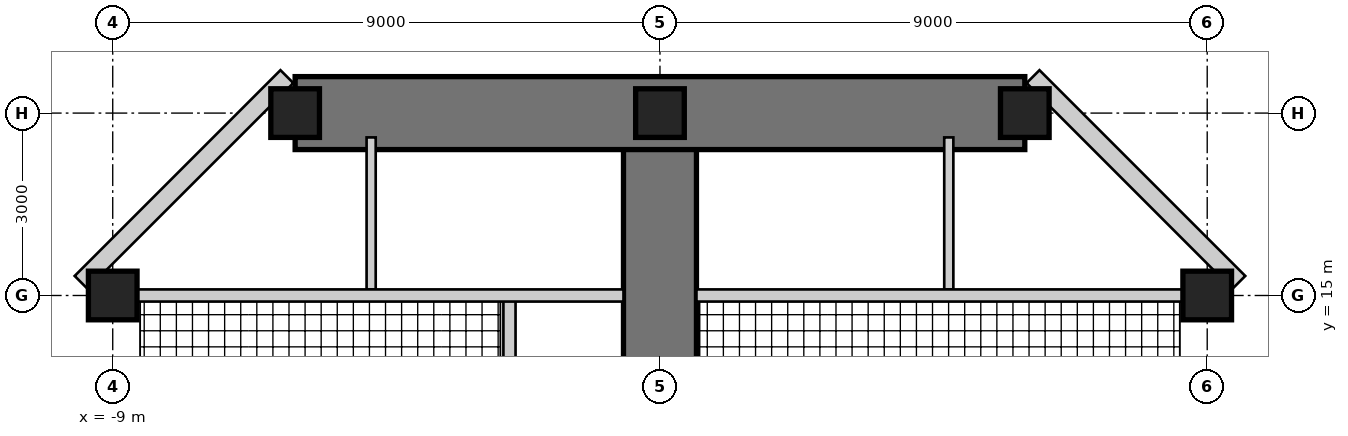
"""IFC4 building model, lengths in metres.
Left out: names, types, materials, properties, quantities, classifications, styles, units other than length and angle.
Written with IfcOpenShell. Run it as: python <this file> out.ifc"""

import sys

from ifc_helpers import new_model, si_unit, direction, frame, frame_2d, origin, origin_2d, place, context, subcontext, project, spatial, rectangle, hollow_rectangle, extrude, element, fill, save


model = new_model("IFC4")
c1 = context("Model", 3, precision=1e-05, world=origin(), true_north=direction((0.0, 1.0)))
c2 = subcontext(c1, "Body", "Model", "MODEL_VIEW")
j1 = project(units=[si_unit("LENGTHUNIT", "METRE"), si_unit("PLANEANGLEUNIT", "RADIAN")], contexts=[c1])
p1 = place(None, origin())
s1 = spatial("IfcSite", under=j1, at=p1, CompositionType="ELEMENT")
p2 = place(p1, origin())
s2 = spatial("IfcBuilding", under=s1, at=p2, CompositionType="ELEMENT")
p3 = place(p2, frame((0.0, 0.0, 225.5)))
s3 = spatial("IfcBuildingStorey", under=s2, at=p3, CompositionType="ELEMENT", Elevation=225.5)
p4 = place(p3, frame((0.0, 9.0, 0.0), z_axis=(0.0, 0.0, 1.0), x_axis=(0.0, 1.0, 0.0)))
e1 = element("IfcWall", 1, at=p4, inside=s3, PredefinedType="SHEAR", context=c2, shape_type="SweptSolid", body=[
    extrude(rectangle(XDim=9.0, YDim=1.2, at=frame_2d((4.5, 0.0))), origin(), (0.0, 0.0, 1.0), 3.4),
])
p5 = place(p4, frame((3.8, 0.0, 0.0)))
e2 = element("IfcOpeningElement", 2, at=p5, cuts=e1, PredefinedType="OPENING", context=c2, shape_type="SweptSolid", body=[
    extrude(rectangle(XDim=1.0, YDim=2.15, at=frame_2d((0.5, 1.075))), frame((0.0, 0.61, 0.0), z_axis=(0.0, -1.0, 0.0), x_axis=(1.0, 0.0, 0.0)), (0.0, 0.0, 1.0), 1.22),
])
p6 = place(p4, frame((7.0, 0.0, 0.0)))
e3 = element("IfcOpeningElement", 3, at=p6, cuts=e1, PredefinedType="OPENING", context=c2, shape_type="SweptSolid", body=[
    extrude(rectangle(XDim=1.0, YDim=2.2, at=frame_2d((0.5, 1.1))), frame((0.0, 0.61, 0.0), z_axis=(0.0, -1.0, 0.0), x_axis=(1.0, 0.0, 0.0)), (0.0, 0.0, 1.0), 1.22),
])
p7 = place(p3, frame((6.0, 18.0, 0.0), z_axis=(0.0, 0.0, 1.0), x_axis=(-1.0, 0.0, 0.0)))
e4 = element("IfcWall", 4, at=p7, inside=s3, PredefinedType="SHEAR", context=c2, shape_type="SweptSolid", body=[
    extrude(rectangle(XDim=12.0, YDim=1.2, at=frame_2d((6.0, 0.0))), origin(), (0.0, 0.0, 1.0), 3.4),
])
p8 = place(p7, frame((1.5, 0.0, 0.6)))
e5 = element("IfcOpeningElement", 5, at=p8, cuts=e4, PredefinedType="OPENING", context=c2, shape_type="SweptSolid", body=[
    extrude(rectangle(XDim=3.0, YDim=2.4, at=frame_2d((1.5, 1.2))), frame((0.0, 0.61, 0.0), z_axis=(0.0, -1.0, 0.0), x_axis=(1.0, 0.0, 0.0)), (0.0, 0.0, 1.0), 1.22),
])
p9 = place(p7, frame((7.5, 0.0, 0.6)))
e6 = element("IfcOpeningElement", 6, at=p9, cuts=e4, PredefinedType="OPENING", context=c2, shape_type="SweptSolid", body=[
    extrude(rectangle(XDim=3.0, YDim=2.4, at=frame_2d((1.5, 1.2))), frame((0.0, 0.61, 0.0), z_axis=(0.0, -1.0, 0.0), x_axis=(1.0, 0.0, 0.0)), (0.0, 0.0, 1.0), 1.22),
])
for number, where, z_axis, x_axis in (
    (7, (9.0, 15.0, 0.0), (0.0, 0.0, 1.0), (1.0, 0.0, 0.0)),
    (8, (-9.0, 15.0, 0.0), (0.0, 0.0, 1.0), (1.0, 0.0, 0.0)),
    (9, (6.0, 18.0, 0.0), (0.0, 0.0, 1.0), (1.0, 0.0, 0.0)),
    (10, (0.0, 18.0, 0.0), (0.0, 0.0, 1.0), (1.0, 0.0, 0.0)),
    (11, (-6.0, 18.0, 0.0), (0.0, 0.0, 1.0), (1.0, 0.0, 0.0)),
):
    element("IfcColumn", number, at=place(p3, frame(where, z_axis=z_axis, x_axis=x_axis)), inside=s3, PredefinedType="COLUMN", context=c2, shape_type="SweptSolid", body=[
        extrude(rectangle(XDim=0.8, YDim=0.8, at=origin_2d()), origin(), (0.0, 0.0, 1.0), 3.4),
    ])
p10 = place(p3, frame((9.52, 15.215, 0.0), z_axis=(0.0, 0.0, 1.0), x_axis=(-0.707081278264, 0.707132283189, 0.0)))
e12 = element("IfcWall", 12, at=p10, inside=s3, PredefinedType="SOLIDWALL", context=c2, shape_type="SweptSolid", body=[
    extrude(rectangle(XDim=4.787, YDim=0.3, at=frame_2d((2.393, 0.0))), origin(), (0.0, 0.0, 1.0), 3.22),
])
p11 = place(p10, frame((1.943, 0.0, 0.3)))
e13 = element("IfcOpeningElement", 13, at=p11, cuts=e12, PredefinedType="OPENING", context=c2, shape_type="SweptSolid", body=[
    extrude(rectangle(XDim=0.9, YDim=2.4, at=frame_2d((0.45, 1.2))), frame((0.0, 0.16, 0.0), z_axis=(0.0, -1.0, 0.0), x_axis=(1.0, 0.0, 0.0)), (0.0, 0.0, 1.0), 0.32),
])
p12 = place(p3, frame((-6.135, 18.6, 0.0), z_axis=(0.0, 0.0, 1.0), x_axis=(-0.707081278264, -0.707132283189, 0.0)))
e14 = element("IfcWall", 14, at=p12, inside=s3, PredefinedType="SOLIDWALL", context=c2, shape_type="SweptSolid", body=[
    extrude(rectangle(XDim=4.787, YDim=0.3, at=frame_2d((2.393, 0.0))), origin(), (0.0, 0.0, 1.0), 3.22),
])
p13 = place(p12, frame((1.943, 0.0, 0.3)))
e15 = element("IfcOpeningElement", 15, at=p13, cuts=e14, PredefinedType="OPENING", context=c2, shape_type="SweptSolid", body=[
    extrude(rectangle(XDim=0.9, YDim=2.4, at=frame_2d((0.45, 1.2))), frame((0.0, 0.16, 0.0), z_axis=(0.0, -1.0, 0.0), x_axis=(1.0, 0.0, 0.0)), (0.0, 0.0, 1.0), 0.32),
])
p14 = place(p3, frame((-2.475, 9.4, 0.0), z_axis=(0.0, 0.0, 1.0), x_axis=(0.0, 1.0, 0.0)))
e16 = element("IfcWall", 16, at=p14, inside=s3, PredefinedType="SOLIDWALL", context=c2, shape_type="SweptSolid", body=[
    extrude(rectangle(XDim=5.6, YDim=0.2, at=frame_2d((2.8, 0.0))), origin(), (0.0, 0.0, 1.0), 3.22),
])
p15 = place(p14, frame((3.4, 0.0, 0.0)))
e17 = element("IfcOpeningElement", 17, at=p15, cuts=e16, PredefinedType="OPENING", context=c2, shape_type="SweptSolid", body=[
    extrude(rectangle(XDim=1.0, YDim=2.15, at=frame_2d((0.5, 1.075))), frame((0.0, 0.11, 0.0), z_axis=(0.0, -1.0, 0.0), x_axis=(1.0, 0.0, 0.0)), (0.0, 0.0, 1.0), 0.22),
])
p16 = place(p3, frame((-4.75, 15.1, 0.0), z_axis=(0.0, 0.0, 1.0), x_axis=(0.0, 1.0, 0.0)))
e18 = element("IfcWall", 18, at=p16, inside=s3, PredefinedType="PARTITIONING", context=c2, shape_type="SweptSolid", body=[
    extrude(rectangle(XDim=2.5, YDim=0.15, at=frame_2d((1.25, 0.0))), origin(), (0.0, 0.0, 1.0), 3.22),
])
p17 = place(p16, frame((0.6, 0.0, 0.0)))
e19 = element("IfcOpeningElement", 19, at=p17, cuts=e18, PredefinedType="OPENING", context=c2, shape_type="SweptSolid", body=[
    extrude(rectangle(XDim=1.0, YDim=2.1, at=frame_2d((0.5, 1.05))), frame((0.0, 0.085, 0.0), z_axis=(0.0, -1.0, 0.0), x_axis=(1.0, 0.0, 0.0)), (0.0, 0.0, 1.0), 0.17),
])
p18 = place(p3, frame((4.75, 15.1, 0.0), z_axis=(0.0, 0.0, 1.0), x_axis=(0.0, 1.0, 0.0)))
e20 = element("IfcWall", 20, at=p18, inside=s3, PredefinedType="PARTITIONING", context=c2, shape_type="SweptSolid", body=[
    extrude(rectangle(XDim=2.5, YDim=0.15, at=frame_2d((1.25, 0.0))), origin(), (0.0, 0.0, 1.0), 3.22),
])
p19 = place(p18, frame((0.6, 0.0, 0.0)))
e21 = element("IfcOpeningElement", 21, at=p19, cuts=e20, PredefinedType="OPENING", context=c2, shape_type="SweptSolid", body=[
    extrude(rectangle(XDim=1.0, YDim=2.1, at=frame_2d((0.5, 1.05))), frame((0.0, 0.085, 0.0), z_axis=(0.0, -1.0, 0.0), x_axis=(1.0, 0.0, 0.0)), (0.0, 0.0, 1.0), 0.17),
])
p20 = place(p3, frame((8.6, 15.0, 0.0), z_axis=(0.0, 0.0, 1.0), x_axis=(-1.0, 0.0, 0.0)))
e22 = element("IfcWall", 22, at=p20, inside=s3, PredefinedType="SOLIDWALL", context=c2, shape_type="SweptSolid", body=[
    extrude(rectangle(XDim=8.0, YDim=0.2, at=frame_2d((4.0, 0.0))), origin(), (0.0, 0.0, 1.0), 2.52),
])
p21 = place(p3, frame((-0.6, 15.0, 0.0), z_axis=(0.0, 0.0, 1.0), x_axis=(-1.0, 0.0, 0.0)))
e23 = element("IfcWall", 23, at=p21, inside=s3, PredefinedType="SOLIDWALL", context=c2, shape_type="SweptSolid", body=[
    extrude(rectangle(XDim=8.0, YDim=0.2, at=frame_2d((4.0, 0.0))), origin(), (0.0, 0.0, 1.0), 2.52),
])
p22 = place(p21, frame((0.35, 0.0, 0.0)))
e24 = element("IfcOpeningElement", 24, at=p22, cuts=e23, PredefinedType="OPENING", context=c2, shape_type="SweptSolid", body=[
    extrude(rectangle(XDim=1.0, YDim=2.2, at=frame_2d((0.5, 1.1))), frame((0.0, 0.11, 0.0), z_axis=(0.0, -1.0, 0.0), x_axis=(1.0, 0.0, 0.0)), (0.0, 0.0, 1.0), 0.22),
])
p23 = place(p11, origin())
e25 = element("IfcWindow", 25, at=p23, inside=s3, PartitioningType="SINGLE_PANEL", PredefinedType="WINDOW", context=c2, shape_type="SweptSolid", body=[
    extrude(hollow_rectangle(XDim=0.9, YDim=2.4, WallThickness=0.06, at=frame_2d((0.45, 1.2))), frame((0.0, 0.03, 0.0), z_axis=(0.0, -1.0, 0.0), x_axis=(1.0, 0.0, 0.0)), (0.0, 0.0, 1.0), 0.06),
    extrude(rectangle(XDim=0.779, YDim=2.279, at=frame_2d((0.45, 1.2))), frame((0.0, 0.03, 0.0), z_axis=(0.0, -1.0, 0.0), x_axis=(1.0, 0.0, 0.0)), (0.0, 0.0, 1.0), 0.06),
])
fill(e13, e25)
p24 = place(p8, origin())
e26 = element("IfcWindow", 26, at=p24, inside=s3, PartitioningType="SINGLE_PANEL", PredefinedType="WINDOW", context=c2, shape_type="SweptSolid", body=[
    extrude(hollow_rectangle(XDim=3.0, YDim=2.4, WallThickness=0.06, at=frame_2d((1.5, 1.2))), frame((0.0, 0.03, 0.0), z_axis=(0.0, -1.0, 0.0), x_axis=(1.0, 0.0, 0.0)), (0.0, 0.0, 1.0), 0.06),
    extrude(rectangle(XDim=2.879, YDim=2.279, at=frame_2d((1.5, 1.2))), frame((0.0, 0.03, 0.0), z_axis=(0.0, -1.0, 0.0), x_axis=(1.0, 0.0, 0.0)), (0.0, 0.0, 1.0), 0.06),
])
fill(e5, e26)
p25 = place(p9, origin())
e27 = element("IfcWindow", 27, at=p25, inside=s3, PartitioningType="SINGLE_PANEL", PredefinedType="WINDOW", context=c2, shape_type="SweptSolid", body=[
    extrude(hollow_rectangle(XDim=3.0, YDim=2.4, WallThickness=0.06, at=frame_2d((1.5, 1.2))), frame((0.0, 0.03, 0.0), z_axis=(0.0, -1.0, 0.0), x_axis=(1.0, 0.0, 0.0)), (0.0, 0.0, 1.0), 0.06),
    extrude(rectangle(XDim=2.879, YDim=2.279, at=frame_2d((1.5, 1.2))), frame((0.0, 0.03, 0.0), z_axis=(0.0, -1.0, 0.0), x_axis=(1.0, 0.0, 0.0)), (0.0, 0.0, 1.0), 0.06),
])
fill(e6, e27)
p26 = place(p13, origin())
e28 = element("IfcWindow", 28, at=p26, inside=s3, PartitioningType="SINGLE_PANEL", PredefinedType="WINDOW", context=c2, shape_type="SweptSolid", body=[
    extrude(hollow_rectangle(XDim=0.9, YDim=2.4, WallThickness=0.06, at=frame_2d((0.45, 1.2))), frame((0.0, 0.03, 0.0), z_axis=(0.0, -1.0, 0.0), x_axis=(1.0, 0.0, 0.0)), (0.0, 0.0, 1.0), 0.06),
    extrude(rectangle(XDim=0.779, YDim=2.279, at=frame_2d((0.45, 1.2))), frame((0.0, 0.03, 0.0), z_axis=(0.0, -1.0, 0.0), x_axis=(1.0, 0.0, 0.0)), (0.0, 0.0, 1.0), 0.06),
])
fill(e15, e28)
p27 = place(p17, origin())
e29 = element("IfcDoor", 29, at=p27, inside=s3, OperationType="SINGLE_SWING_LEFT", PredefinedType="DOOR", context=c2, shape_type="SweptSolid", body=[
    extrude(rectangle(XDim=1.0, YDim=2.1, at=frame_2d((0.5, 1.05))), frame((0.0, 0.025, 0.0), z_axis=(0.0, -1.0, 0.0), x_axis=(1.0, 0.0, 0.0)), (0.0, 0.0, 1.0), 0.05),
])
fill(e19, e29)
p28 = place(p19, frame((1.0, 0.0, 0.0), z_axis=(0.0, 0.0, 1.0), x_axis=(-1.0, 0.0, 0.0)))
e30 = element("IfcDoor", 30, at=p28, inside=s3, OperationType="SINGLE_SWING_RIGHT", PredefinedType="DOOR", context=c2, shape_type="SweptSolid", body=[
    extrude(rectangle(XDim=1.0, YDim=2.1, at=frame_2d((0.5, 1.05))), frame((0.0, 0.025, 0.0), z_axis=(0.0, -1.0, 0.0), x_axis=(1.0, 0.0, 0.0)), (0.0, 0.0, 1.0), 0.05),
])
fill(e21, e30)
p29 = place(p22, frame((1.0, 0.0, 0.0), z_axis=(0.0, 0.0, 1.0), x_axis=(-1.0, 0.0, 0.0)))
e31 = element("IfcDoor", 31, at=p29, inside=s3, OperationType="SINGLE_SWING_RIGHT", PredefinedType="DOOR", context=c2, shape_type="SweptSolid", body=[
    extrude(rectangle(XDim=1.0, YDim=2.2, at=frame_2d((0.5, 1.1))), frame((0.0, 0.025, 0.0), z_axis=(0.0, -1.0, 0.0), x_axis=(1.0, 0.0, 0.0)), (0.0, 0.0, 1.0), 0.05),
])
fill(e24, e31)
p30 = place(p6, origin())
e32 = element("IfcDoor", 32, at=p30, inside=s3, OperationType="SINGLE_SWING_RIGHT", PredefinedType="DOOR", context=c2, shape_type="SweptSolid", body=[
    extrude(rectangle(XDim=1.0, YDim=2.2, at=frame_2d((0.5, 1.1))), frame((0.0, 0.025, 0.0), z_axis=(0.0, -1.0, 0.0), x_axis=(1.0, 0.0, 0.0)), (0.0, 0.0, 1.0), 0.05),
])
fill(e3, e32)
save(model, sys.argv[1])
